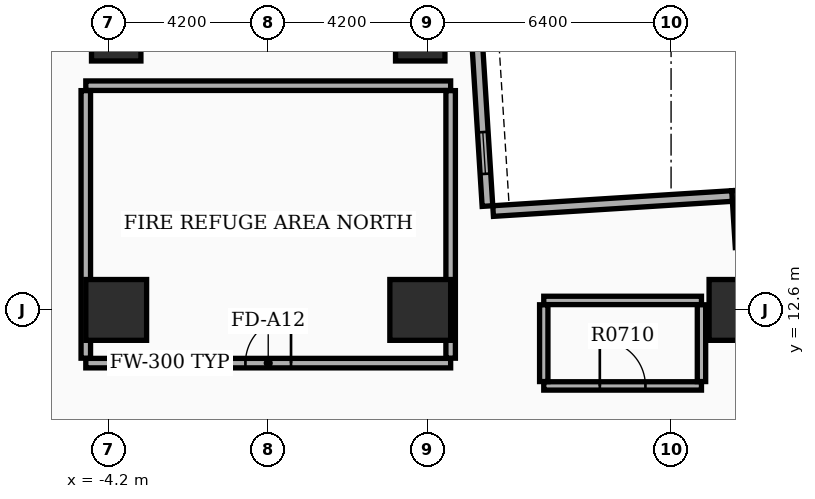
"""IFC4 building model, lengths in metres.
Left out: names, types, materials, properties, quantities, classifications, styles, units other than length and angle.
Written with IfcOpenShell. Run it as: python <this file> out.ifc"""

import sys

from ifc_helpers import new_model, si_unit, direction, frame, frame_2d, origin, origin_2d, place, context, subcontext, project, spatial, rectangle, extrude, element, fill, save


model = new_model("IFC4")
c1 = context("Model", 3, precision=1e-05, world=origin(), true_north=direction((0.0, 1.0)))
c2 = subcontext(c1, "Body", "Model", "MODEL_VIEW")
j1 = project(units=[si_unit("LENGTHUNIT", "METRE"), si_unit("PLANEANGLEUNIT", "RADIAN")], contexts=[c1])
p1 = place(None, origin())
s1 = spatial("IfcSite", under=j1, at=p1, CompositionType="ELEMENT")
p2 = place(p1, origin())
s2 = spatial("IfcBuilding", under=s1, at=p2, CompositionType="ELEMENT")
p3 = place(p2, frame((0.0, 0.0, 47.1)))
s3 = spatial("IfcBuildingStorey", under=s2, at=p3, CompositionType="ELEMENT", Elevation=47.1)
for number, where, z_axis, x_axis in (
    (1, (12.4, 12.6, 0.0), (0.0, 0.0, 1.0), (1.0, 0.0, 0.0)),
    (2, (4.0, 12.6, 0.0), (0.0, 0.0, 1.0), (1.0, 0.0, 0.0)),
    (3, (-4.0, 12.6, 0.0), (0.0, 0.0, 1.0), (1.0, 0.0, 0.0)),
):
    element("IfcColumn", number, at=place(p3, frame(where, z_axis=z_axis, x_axis=x_axis)), inside=s3, PredefinedType="COLUMN", context=c2, shape_type="SweptSolid", body=[
        extrude(rectangle(XDim=1.6, YDim=1.6, at=origin_2d()), origin(), (0.0, 0.0, 1.0), 5.1),
    ])
for number, where, z_axis, x_axis in (
    (4, (-4.0, 19.8, 0.0), (0.0, 0.0, 1.0), (1.0, 0.0, 0.0)),
    (5, (4.0, 19.8, 0.0), (0.0, 0.0, 1.0), (1.0, 0.0, 0.0)),
):
    element("IfcColumn", number, at=place(p3, frame(where, z_axis=z_axis, x_axis=x_axis)), inside=s3, PredefinedType="COLUMN", context=c2, shape_type="SweptSolid", body=[
        extrude(rectangle(XDim=1.3, YDim=1.3, at=origin_2d()), origin(), (0.0, 0.0, 1.0), 5.1),
    ])
p4 = place(p3, frame((5.769, 15.333, 0.0), z_axis=(0.0, 0.0, 1.0), x_axis=(-0.062784355807, 0.998027116198, 0.0)))
e6 = element("IfcWall", 6, at=p4, inside=s3, PredefinedType="STANDARD", context=c2, shape_type="SweptSolid", body=[
    extrude(rectangle(XDim=20.1, YDim=0.28, at=frame_2d((10.05, 0.0))), origin(), (0.0, 0.0, 1.0), 3.98),
])
p5 = place(p4, frame((0.85, 0.0, 0.95)))
e7 = element("IfcOpeningElement", 7, at=p5, cuts=e6, PredefinedType="OPENING", context=c2, shape_type="SweptSolid", body=[
    extrude(rectangle(XDim=1.1, YDim=1.2, at=frame_2d((0.55, 0.6))), frame((0.0, 0.15, 0.0), z_axis=(0.0, -1.0, 0.0), x_axis=(1.0, 0.0, 0.0)), (0.0, 0.0, 1.0), 0.3),
])
p6 = place(p3, frame((12.43, 14.249, 0.0), z_axis=(0.0, 0.0, 1.0), x_axis=(-0.062824119533, 0.998024613927, 0.0)))
e8 = element("IfcWall", 8, at=p6, inside=s3, PredefinedType="STANDARD", context=c2, shape_type="SweptSolid", body=[
    extrude(rectangle(XDim=1.5, YDim=0.28, at=frame_2d((0.75, 0.0))), origin(), (0.0, 0.0, 1.0), 3.98),
])
p7 = place(p3, frame((12.205, 15.597, 0.0), z_axis=(0.0, 0.0, 1.0), x_axis=(-0.998024885752, -0.062819801181, 0.0)))
e9 = element("IfcWall", 9, at=p7, inside=s3, PredefinedType="STANDARD", context=c2, shape_type="SweptSolid", body=[
    extrude(rectangle(XDim=6.3, YDim=0.28, at=frame_2d((3.15, 0.0))), origin(), (0.0, 0.0, 1.0), 3.98),
])
p8 = place(p3, frame((-4.8, 11.2, 0.0), z_axis=(0.0, 0.0, 1.0), x_axis=(1.0, 0.0, 0.0)))
e10 = element("IfcWall", 10, at=p8, inside=s3, PredefinedType="SOLIDWALL", context=c2, shape_type="SweptSolid", body=[
    extrude(rectangle(XDim=9.6, YDim=0.25, at=frame_2d((4.8, 0.0))), origin(), (0.0, 0.0, 1.0), 3.97),
])
p9 = place(p8, frame((4.2, 0.0, 0.0)))
e11 = element("IfcOpeningElement", 11, at=p9, cuts=e10, PredefinedType="OPENING", context=c2, shape_type="SweptSolid", body=[
    extrude(rectangle(XDim=1.2, YDim=2.15, at=frame_2d((0.6, 1.075))), frame((0.0, 0.135, 0.0), z_axis=(0.0, -1.0, 0.0), x_axis=(1.0, 0.0, 0.0)), (0.0, 0.0, 1.0), 0.27),
])
p10 = place(p3, frame((-4.8, 18.5, 0.0), z_axis=(0.0, 0.0, 1.0), x_axis=(1.0, 0.0, 0.0)))
e12 = element("IfcWall", 12, at=p10, inside=s3, PredefinedType="SOLIDWALL", context=c2, shape_type="SweptSolid", body=[
    extrude(rectangle(XDim=9.6, YDim=0.25, at=frame_2d((4.8, 0.0))), origin(), (0.0, 0.0, 1.0), 3.97),
])
for number, where, z_axis, x_axis in (
    (13, (-4.8, 11.33, 0.0), (0.0, 0.0, 1.0), (0.0, 1.0, 0.0)),
    (14, (4.8, 11.33, 0.0), (0.0, 0.0, 1.0), (0.0, 1.0, 0.0)),
):
    element("IfcWall", number, at=place(p3, frame(where, z_axis=z_axis, x_axis=x_axis)), inside=s3, PredefinedType="SOLIDWALL", context=c2, shape_type="SweptSolid", body=[
        extrude(rectangle(XDim=7.04, YDim=0.25, at=frame_2d((3.52, 0.0))), origin(), (0.0, 0.0, 1.0), 3.97),
    ])
p11 = place(p3, frame((7.25, 10.6, 0.0), z_axis=(0.0, 0.0, 1.0), x_axis=(1.0, 0.0, 0.0)))
e15 = element("IfcWall", 15, at=p11, inside=s3, PredefinedType="PARTITIONING", context=c2, shape_type="SweptSolid", body=[
    extrude(rectangle(XDim=4.15, YDim=0.22, at=frame_2d((2.075, 0.0))), origin(), (0.0, 0.0, 1.0), 3.97),
])
p12 = place(p11, frame((1.475, 0.0, 0.0)))
e16 = element("IfcOpeningElement", 16, at=p12, cuts=e15, PredefinedType="OPENING", context=c2, shape_type="SweptSolid", body=[
    extrude(rectangle(XDim=1.2, YDim=2.15, at=frame_2d((0.6, 1.075))), frame((0.0, 0.12, 0.0), z_axis=(0.0, -1.0, 0.0), x_axis=(1.0, 0.0, 0.0)), (0.0, 0.0, 1.0), 0.24),
])
p13 = place(p3, frame((7.25, 12.85, 0.0), z_axis=(0.0, 0.0, 1.0), x_axis=(1.0, 0.0, 0.0)))
e17 = element("IfcWall", 17, at=p13, inside=s3, PredefinedType="PARTITIONING", context=c2, shape_type="SweptSolid", body=[
    extrude(rectangle(XDim=4.15, YDim=0.22, at=frame_2d((2.075, 0.0))), origin(), (0.0, 0.0, 1.0), 3.97),
])
for number, where, z_axis, x_axis in (
    (18, (7.25, 10.715, 0.0), (0.0, 0.0, 1.0), (0.0, 1.0, 0.0)),
    (19, (11.4, 10.715, 0.0), (0.0, 0.0, 1.0), (0.0, 1.0, 0.0)),
):
    element("IfcWall", number, at=place(p3, frame(where, z_axis=z_axis, x_axis=x_axis)), inside=s3, PredefinedType="PARTITIONING", context=c2, shape_type="SweptSolid", body=[
        extrude(rectangle(XDim=2.02, YDim=0.22, at=frame_2d((1.01, 0.0))), origin(), (0.0, 0.0, 1.0), 3.97),
    ])
p14 = place(p5, origin())
e20 = element("IfcWindow", 20, at=p14, inside=s3, PartitioningType="SINGLE_PANEL", PredefinedType="WINDOW", context=c2, shape_type="SweptSolid", body=[
    extrude(rectangle(XDim=1.1, YDim=1.2, at=frame_2d((0.55, 0.6))), frame((0.0, 0.03, 0.0), z_axis=(0.0, -1.0, 0.0), x_axis=(1.0, 0.0, 0.0)), (0.0, 0.0, 1.0), 0.06),
])
fill(e7, e20)
p15 = place(p9, origin())
e21 = element("IfcDoor", 21, at=p15, inside=s3, OperationType="SINGLE_SWING_RIGHT", PredefinedType="DOOR", context=c2, shape_type="SweptSolid", body=[
    extrude(rectangle(XDim=1.2, YDim=2.15, at=frame_2d((0.6, 1.075))), frame((0.0, 0.025, 0.0), z_axis=(0.0, -1.0, 0.0), x_axis=(1.0, 0.0, 0.0)), (0.0, 0.0, 1.0), 0.05),
])
fill(e11, e21)
p16 = place(p12, origin())
e22 = element("IfcDoor", 22, at=p16, inside=s3, OperationType="SINGLE_SWING_LEFT", PredefinedType="DOOR", context=c2, shape_type="SweptSolid", body=[
    extrude(rectangle(XDim=1.2, YDim=2.15, at=frame_2d((0.6, 1.075))), frame((0.0, 0.025, 0.0), z_axis=(0.0, -1.0, 0.0), x_axis=(1.0, 0.0, 0.0)), (0.0, 0.0, 1.0), 0.05),
])
fill(e16, e22)
save(model, sys.argv[1])
